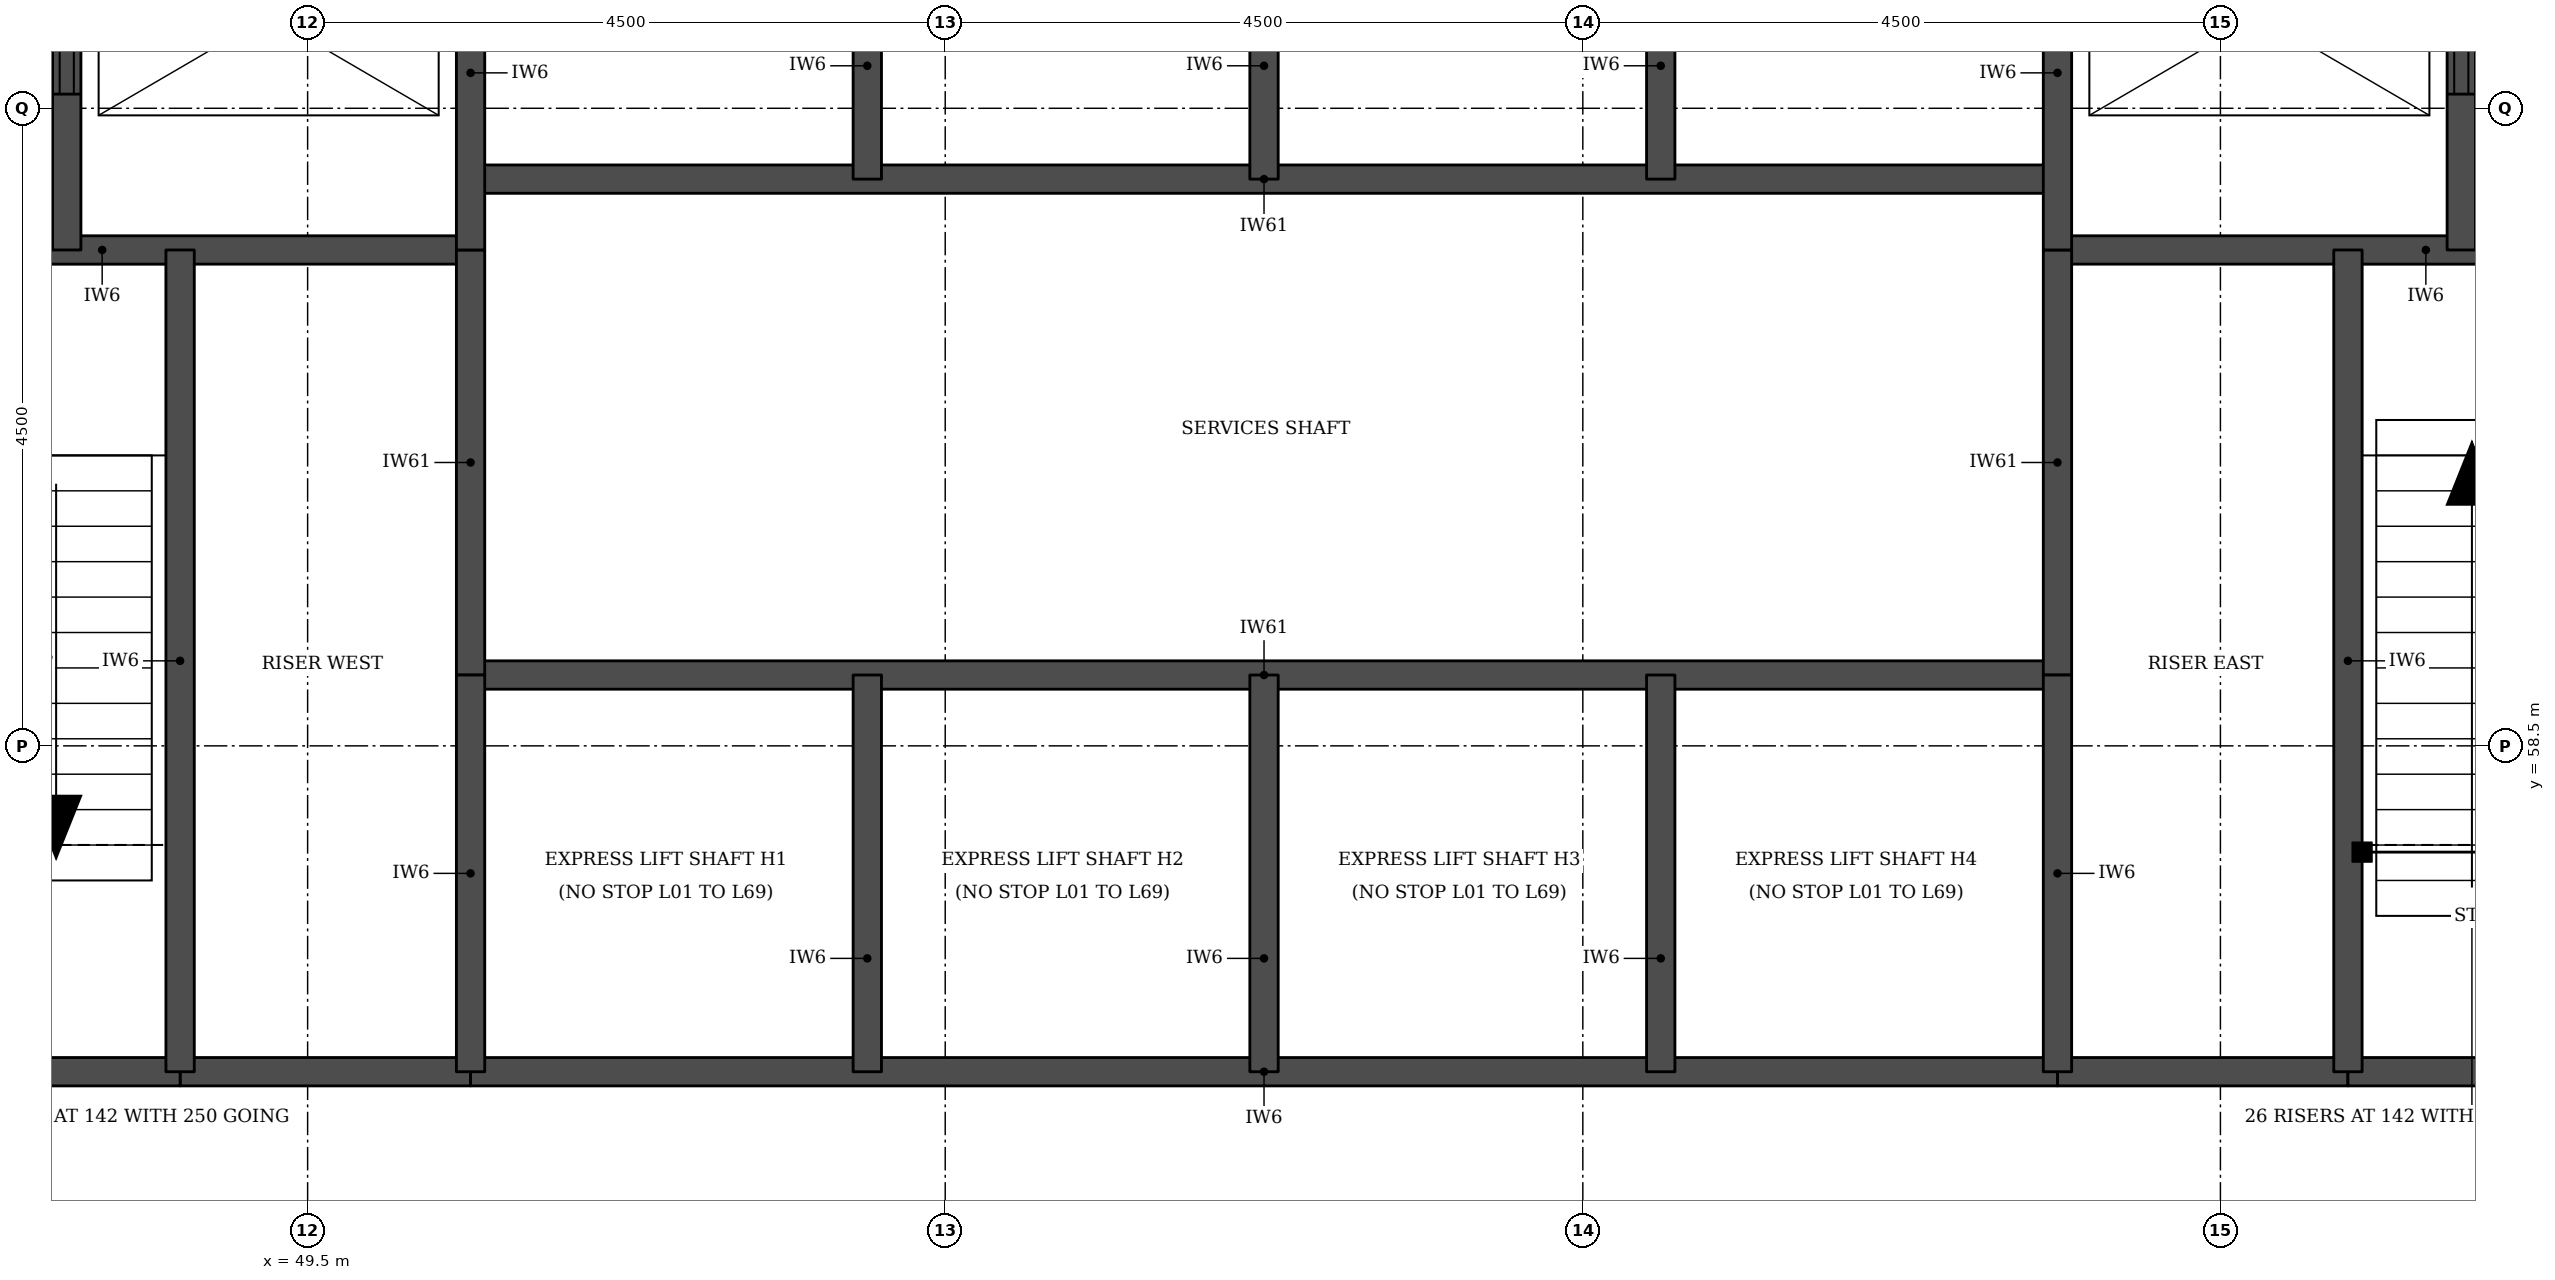
"""IFC4 building model, lengths in metres.
Left out: names, types, materials, properties, quantities, classifications, styles, units other than length and angle.
Written with IfcOpenShell. Run it as: python <this file> out.ifc"""

import sys

from ifc_helpers import new_model, si_unit, direction, frame, frame_2d, origin, place, context, subcontext, project, spatial, rectangle, extrude, element, fill, save


model = new_model("IFC4")
c1 = context("Model", 3, precision=1e-05, world=origin(), true_north=direction((0.0, 1.0)))
c2 = subcontext(c1, "Body", "Model", "MODEL_VIEW")
j1 = project(units=[si_unit("LENGTHUNIT", "METRE"), si_unit("PLANEANGLEUNIT", "RADIAN")], contexts=[c1])
p1 = place(None, origin())
s1 = spatial("IfcSite", under=j1, at=p1, CompositionType="ELEMENT")
p2 = place(p1, origin())
s2 = spatial("IfcBuilding", under=s1, at=p2, CompositionType="ELEMENT")
p3 = place(p2, frame((0.0, 0.0, 108.5)))
s3 = spatial("IfcBuildingStorey", under=s2, at=p3, CompositionType="ELEMENT", Elevation=108.5)
for number, where, z_axis, x_axis in (
    (1, (48.6, 56.2, 0.0), (0.0, 0.0, 1.0), (1.0, 0.0, 0.0)),
    (2, (61.85, 56.2, 0.0), (0.0, 0.0, 1.0), (1.0, 0.0, 0.0)),
):
    element("IfcWall", number, at=place(p3, frame(where, z_axis=z_axis, x_axis=x_axis)), inside=s3, PredefinedType="SOLIDWALL", context=c2, shape_type="SweptSolid", body=[
        extrude(rectangle(XDim=2.05, YDim=0.2, at=frame_2d((1.025, 0.0))), origin(), (0.0, 0.0, 1.0), 3.55),
    ])
p4 = place(p3, frame((45.45, 56.2, 0.0), z_axis=(0.0, 0.0, 1.0), x_axis=(1.0, 0.0, 0.0)))
e3 = element("IfcWall", 3, at=p4, inside=s3, PredefinedType="SOLIDWALL", context=c2, shape_type="SweptSolid", body=[
    extrude(rectangle(XDim=3.15, YDim=0.2, at=frame_2d((1.575, 0.0))), origin(), (0.0, 0.0, 1.0), 3.55),
])
p5 = place(p3, frame((50.65, 56.2, 0.0), z_axis=(0.0, 0.0, 1.0), x_axis=(1.0, 0.0, 0.0)))
e4 = element("IfcWall", 4, at=p5, inside=s3, PredefinedType="SOLIDWALL", context=c2, shape_type="SweptSolid", body=[
    extrude(rectangle(XDim=11.2, YDim=0.2, at=frame_2d((5.6, 0.0))), origin(), (0.0, 0.0, 1.0), 3.55),
])
p6 = place(p3, frame((63.9, 56.2, 0.0), z_axis=(0.0, 0.0, 1.0), x_axis=(1.0, 0.0, 0.0)))
e5 = element("IfcWall", 5, at=p6, inside=s3, PredefinedType="SOLIDWALL", context=c2, shape_type="SweptSolid", body=[
    extrude(rectangle(XDim=3.15, YDim=0.2, at=frame_2d((1.575, 0.0))), origin(), (0.0, 0.0, 1.0), 3.55),
])
p7 = place(p3, frame((50.65, 59.0, 0.0), z_axis=(0.0, 0.0, 1.0), x_axis=(1.0, 0.0, 0.0)))
e6 = element("IfcWall", 6, at=p7, inside=s3, PredefinedType="SOLIDWALL", context=c2, shape_type="SweptSolid", body=[
    extrude(rectangle(XDim=11.2, YDim=0.2, at=frame_2d((5.6, 0.0))), origin(), (0.0, 0.0, 1.0), 3.7),
])
for number, where, z_axis, x_axis in (
    (7, (45.45, 62.0, 0.0), (0.0, 0.0, 1.0), (1.0, 0.0, 0.0)),
    (8, (61.85, 62.0, 0.0), (0.0, 0.0, 1.0), (1.0, 0.0, 0.0)),
):
    element("IfcWall", number, at=place(p3, frame(where, z_axis=z_axis, x_axis=x_axis)), inside=s3, PredefinedType="SOLIDWALL", context=c2, shape_type="SweptSolid", body=[
        extrude(rectangle(XDim=5.2, YDim=0.2, at=frame_2d((2.6, 0.0))), origin(), (0.0, 0.0, 1.0), 3.55),
    ])
p8 = place(p3, frame((50.65, 62.5, 0.0), z_axis=(0.0, 0.0, 1.0), x_axis=(1.0, 0.0, 0.0)))
e9 = element("IfcWall", 9, at=p8, inside=s3, PredefinedType="SOLIDWALL", context=c2, shape_type="SweptSolid", body=[
    extrude(rectangle(XDim=11.2, YDim=0.2, at=frame_2d((5.6, 0.0))), origin(), (0.0, 0.0, 1.0), 3.7),
])
p9 = place(p3, frame((47.8, 62.0, 0.0), z_axis=(0.0, 0.0, 1.0), x_axis=(0.0, 1.0, 0.0)))
e10 = element("IfcWall", 10, at=p9, inside=s3, PredefinedType="SOLIDWALL", context=c2, shape_type="SweptSolid", body=[
    extrude(rectangle(XDim=3.3, YDim=0.2, at=frame_2d((1.65, 0.0))), origin(), (0.0, 0.0, 1.0), 3.55),
])
p10 = place(p9, frame((1.1, 0.0, 0.0)))
e11 = element("IfcOpeningElement", 11, at=p10, cuts=e10, PredefinedType="OPENING", context=c2, shape_type="SweptSolid", body=[
    extrude(rectangle(XDim=1.1, YDim=2.1, at=frame_2d((0.55, 1.05))), frame((0.0, 0.11, 0.0), z_axis=(0.0, -1.0, 0.0), x_axis=(1.0, 0.0, 0.0)), (0.0, 0.0, 1.0), 0.22),
])
p11 = place(p3, frame((48.6, 56.2, 0.0), z_axis=(0.0, 0.0, 1.0), x_axis=(0.0, 1.0, 0.0)))
e12 = element("IfcWall", 12, at=p11, inside=s3, PredefinedType="SOLIDWALL", context=c2, shape_type="SweptSolid", body=[
    extrude(rectangle(XDim=5.8, YDim=0.2, at=frame_2d((2.9, 0.0))), origin(), (0.0, 0.0, 1.0), 3.55),
])
p12 = place(p3, frame((50.65, 59.0, 0.0), z_axis=(0.0, 0.0, 1.0), x_axis=(0.0, 1.0, 0.0)))
e13 = element("IfcWall", 13, at=p12, inside=s3, PredefinedType="SOLIDWALL", context=c2, shape_type="SweptSolid", body=[
    extrude(rectangle(XDim=3.0, YDim=0.2, at=frame_2d((1.5, 0.0))), origin(), (0.0, 0.0, 1.0), 3.7),
])
p13 = place(p3, frame((50.65, 56.2, 0.0), z_axis=(0.0, 0.0, 1.0), x_axis=(0.0, 1.0, 0.0)))
e14 = element("IfcWall", 14, at=p13, inside=s3, PredefinedType="SOLIDWALL", context=c2, shape_type="SweptSolid", body=[
    extrude(rectangle(XDim=2.8, YDim=0.2, at=frame_2d((1.4, 0.0))), origin(), (0.0, 0.0, 1.0), 3.55),
])
p14 = place(p3, frame((50.65, 62.0, 0.0), z_axis=(0.0, 0.0, 1.0), x_axis=(0.0, 1.0, 0.0)))
e15 = element("IfcWall", 15, at=p14, inside=s3, PredefinedType="SOLIDWALL", context=c2, shape_type="SweptSolid", body=[
    extrude(rectangle(XDim=3.3, YDim=0.2, at=frame_2d((1.65, 0.0))), origin(), (0.0, 0.0, 1.0), 3.55),
])
for number, where, z_axis, x_axis in (
    (16, (53.45, 56.2, 0.0), (0.0, 0.0, 1.0), (0.0, 1.0, 0.0)),
    (17, (53.45, 62.5, 0.0), (0.0, 0.0, 1.0), (0.0, 1.0, 0.0)),
    (18, (56.25, 56.2, 0.0), (0.0, 0.0, 1.0), (0.0, 1.0, 0.0)),
    (19, (56.25, 62.5, 0.0), (0.0, 0.0, 1.0), (0.0, 1.0, 0.0)),
    (20, (59.05, 56.2, 0.0), (0.0, 0.0, 1.0), (0.0, 1.0, 0.0)),
    (21, (59.05, 62.5, 0.0), (0.0, 0.0, 1.0), (0.0, 1.0, 0.0)),
):
    element("IfcWall", number, at=place(p3, frame(where, z_axis=z_axis, x_axis=x_axis)), inside=s3, PredefinedType="SOLIDWALL", context=c2, shape_type="SweptSolid", body=[
        extrude(rectangle(XDim=2.8, YDim=0.2, at=frame_2d((1.4, 0.0))), origin(), (0.0, 0.0, 1.0), 3.55),
    ])
p15 = place(p3, frame((61.85, 59.0, 0.0), z_axis=(0.0, 0.0, 1.0), x_axis=(0.0, 1.0, 0.0)))
e22 = element("IfcWall", 22, at=p15, inside=s3, PredefinedType="SOLIDWALL", context=c2, shape_type="SweptSolid", body=[
    extrude(rectangle(XDim=3.0, YDim=0.2, at=frame_2d((1.5, 0.0))), origin(), (0.0, 0.0, 1.0), 3.7),
])
p16 = place(p3, frame((61.85, 56.2, 0.0), z_axis=(0.0, 0.0, 1.0), x_axis=(0.0, 1.0, 0.0)))
e23 = element("IfcWall", 23, at=p16, inside=s3, PredefinedType="SOLIDWALL", context=c2, shape_type="SweptSolid", body=[
    extrude(rectangle(XDim=2.8, YDim=0.2, at=frame_2d((1.4, 0.0))), origin(), (0.0, 0.0, 1.0), 3.55),
])
p17 = place(p3, frame((61.85, 62.0, 0.0), z_axis=(0.0, 0.0, 1.0), x_axis=(0.0, 1.0, 0.0)))
e24 = element("IfcWall", 24, at=p17, inside=s3, PredefinedType="SOLIDWALL", context=c2, shape_type="SweptSolid", body=[
    extrude(rectangle(XDim=3.3, YDim=0.2, at=frame_2d((1.65, 0.0))), origin(), (0.0, 0.0, 1.0), 3.55),
])
p18 = place(p3, frame((63.9, 56.2, 0.0), z_axis=(0.0, 0.0, 1.0), x_axis=(0.0, 1.0, 0.0)))
e25 = element("IfcWall", 25, at=p18, inside=s3, PredefinedType="SOLIDWALL", context=c2, shape_type="SweptSolid", body=[
    extrude(rectangle(XDim=5.8, YDim=0.2, at=frame_2d((2.9, 0.0))), origin(), (0.0, 0.0, 1.0), 3.55),
])
p19 = place(p3, frame((64.7, 62.0, 0.0), z_axis=(0.0, 0.0, 1.0), x_axis=(0.0, 1.0, 0.0)))
e26 = element("IfcWall", 26, at=p19, inside=s3, PredefinedType="SOLIDWALL", context=c2, shape_type="SweptSolid", body=[
    extrude(rectangle(XDim=3.3, YDim=0.2, at=frame_2d((1.65, 0.0))), origin(), (0.0, 0.0, 1.0), 3.55),
])
p20 = place(p19, frame((1.1, 0.0, 0.0)))
e27 = element("IfcOpeningElement", 27, at=p20, cuts=e26, PredefinedType="OPENING", context=c2, shape_type="SweptSolid", body=[
    extrude(rectangle(XDim=1.1, YDim=2.1, at=frame_2d((0.55, 1.05))), frame((0.0, 0.11, 0.0), z_axis=(0.0, -1.0, 0.0), x_axis=(1.0, 0.0, 0.0)), (0.0, 0.0, 1.0), 0.22),
])
p21 = place(p10, origin())
e28 = element("IfcDoor", 28, at=p21, inside=s3, OperationType="DOUBLE_DOOR_SLIDING", PredefinedType="DOOR", context=c2, shape_type="SweptSolid", body=[
    extrude(rectangle(XDim=1.1, YDim=2.1, at=frame_2d((0.55, 1.05))), frame((0.0, 0.025, 0.0), z_axis=(0.0, -1.0, 0.0), x_axis=(1.0, 0.0, 0.0)), (0.0, 0.0, 1.0), 0.05),
])
fill(e11, e28)
p22 = place(p20, origin())
e29 = element("IfcDoor", 29, at=p22, inside=s3, OperationType="DOUBLE_DOOR_SLIDING", PredefinedType="DOOR", context=c2, shape_type="SweptSolid", body=[
    extrude(rectangle(XDim=1.1, YDim=2.1, at=frame_2d((0.55, 1.05))), frame((0.0, 0.025, 0.0), z_axis=(0.0, -1.0, 0.0), x_axis=(1.0, 0.0, 0.0)), (0.0, 0.0, 1.0), 0.05),
])
fill(e27, e29)
save(model, sys.argv[1])
